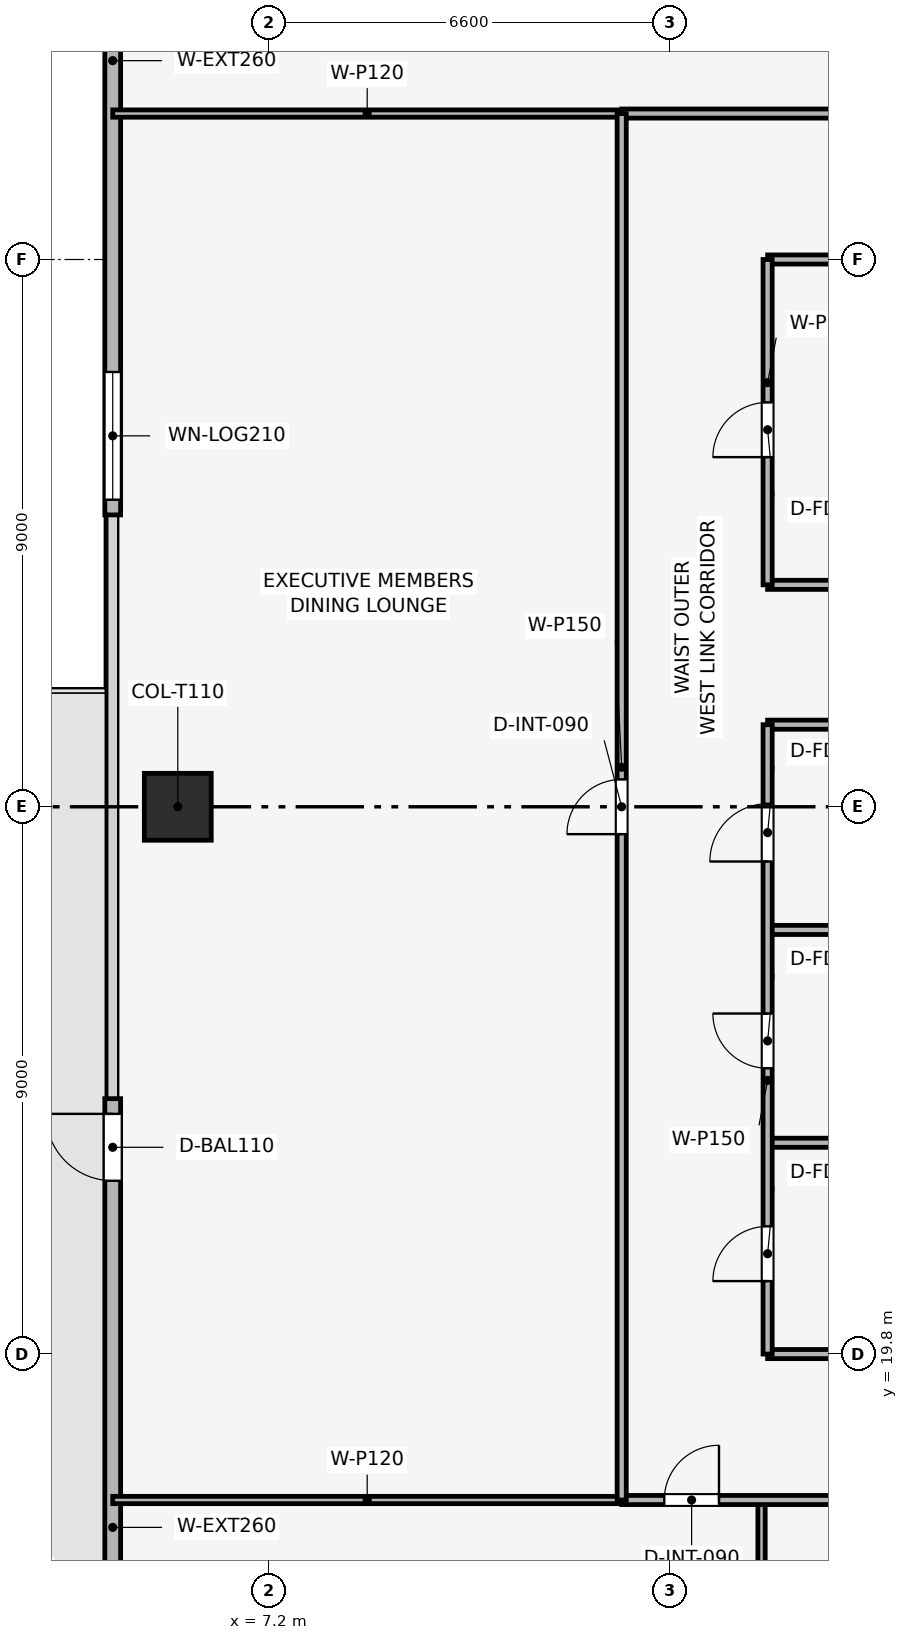
"""IFC4 building model, lengths in metres.
Left out: names, types, materials, properties, quantities, classifications, styles, units other than length and angle.
Written with IfcOpenShell. Run it as: python <this file> out.ifc"""

import sys

from ifc_helpers import new_model, si_unit, direction, frame, frame_2d, origin, origin_2d, place, context, subcontext, project, spatial, rectangle, extrude, element, fill, save


model = new_model("IFC4")
c1 = context("Model", 3, precision=1e-05, world=origin(), true_north=direction((0.0, 1.0)))
c2 = subcontext(c1, "Body", "Model", "MODEL_VIEW")
j1 = project(units=[si_unit("LENGTHUNIT", "METRE"), si_unit("PLANEANGLEUNIT", "RADIAN")], contexts=[c1])
p1 = place(None, origin())
s1 = spatial("IfcSite", under=j1, at=p1, CompositionType="ELEMENT")
p2 = place(p1, origin())
s2 = spatial("IfcBuilding", under=s1, at=p2, CompositionType="ELEMENT")
p3 = place(p2, frame((0.0, 0.0, 187.05)))
s3 = spatial("IfcBuildingStorey", under=s2, at=p3, CompositionType="ELEMENT", Elevation=187.05)
p4 = place(p3, frame((5.7, 28.8, 0.003), z_axis=(0.0, 0.0, 1.0), x_axis=(1.0, 0.0, 0.0)))
e1 = element("IfcColumn", 1, at=p4, inside=s3, PredefinedType="COLUMN", context=c2, shape_type="SweptSolid", body=[
    extrude(rectangle(XDim=1.1, YDim=1.1, at=origin_2d()), origin(), (0.0, 0.0, 1.0), 3.489),
])
p5 = place(p3, frame((4.63, 11.4, 0.0), z_axis=(0.0, 0.0, 1.0), x_axis=(0.0, 1.0, 0.0)))
e2 = element("IfcWall", 2, at=p5, inside=s3, PredefinedType="SOLIDWALL", context=c2, shape_type="SweptSolid", body=[
    extrude(rectangle(XDim=12.6, YDim=0.26, at=frame_2d((6.3, 0.0))), origin(), (0.0, 0.0, 1.0), 3.495),
])
p6 = place(p5, frame((11.25, 0.0, 0.0)))
e3 = element("IfcOpeningElement", 3, at=p6, cuts=e2, PredefinedType="OPENING", context=c2, shape_type="SweptSolid", body=[
    extrude(rectangle(XDim=1.1, YDim=2.2, at=frame_2d((0.55, 1.1))), frame((0.0, 0.14, 0.0), z_axis=(0.0, -1.0, 0.0), x_axis=(1.0, 0.0, 0.0)), (0.0, 0.0, 1.0), 0.28),
])
p7 = place(p3, frame((4.63, 33.6, 0.0), z_axis=(0.0, 0.0, 1.0), x_axis=(0.0, 1.0, 0.0)))
e4 = element("IfcWall", 4, at=p7, inside=s3, PredefinedType="SOLIDWALL", context=c2, shape_type="SweptSolid", body=[
    extrude(rectangle(XDim=12.6, YDim=0.26, at=frame_2d((6.3, 0.0))), origin(), (0.0, 0.0, 1.0), 3.495),
])
p8 = place(p7, frame((0.25, 0.0, 0.9)))
e5 = element("IfcOpeningElement", 5, at=p8, cuts=e4, PredefinedType="OPENING", context=c2, shape_type="SweptSolid", body=[
    extrude(rectangle(XDim=2.1, YDim=2.1, at=frame_2d((1.05, 1.05))), frame((0.0, 0.14, 0.0), z_axis=(0.0, -1.0, 0.0), x_axis=(1.0, 0.0, 0.0)), (0.0, 0.0, 1.0), 0.28),
])
p9 = place(p3, frame((15.4, 19.8, 0.0), z_axis=(0.0, 0.0, 1.0), x_axis=(1.0, 0.0, 0.0)))
e6 = element("IfcWall", 6, at=p9, inside=s3, PredefinedType="PARTITIONING", context=c2, shape_type="SweptSolid", body=[
    extrude(rectangle(XDim=4.4, YDim=0.15, at=frame_2d((2.2, 0.0))), origin(), (0.0, 0.0, 1.0), 3.03),
])
for number, where, z_axis, x_axis in (
    (7, (15.4, 23.275, 0.0), (0.0, 0.0, 1.0), (1.0, 0.0, 0.0)),
    (8, (15.4, 26.775, 0.0), (0.0, 0.0, 1.0), (1.0, 0.0, 0.0)),
    (9, (15.4, 30.15, 0.0), (0.0, 0.0, 1.0), (1.0, 0.0, 0.0)),
    (10, (15.4, 32.45, 0.0), (0.0, 0.0, 1.0), (1.0, 0.0, 0.0)),
):
    element("IfcWall", number, at=place(p3, frame(where, z_axis=z_axis, x_axis=x_axis)), inside=s3, PredefinedType="PARTITIONING", context=c2, shape_type="SweptSolid", body=[
        extrude(rectangle(XDim=4.4, YDim=0.15, at=frame_2d((2.2, 0.0))), origin(), (0.0, 0.0, 1.0), 3.495),
    ])
p10 = place(p3, frame((15.4, 37.8, 0.0), z_axis=(0.0, 0.0, 1.0), x_axis=(1.0, 0.0, 0.0)))
e11 = element("IfcWall", 11, at=p10, inside=s3, PredefinedType="PARTITIONING", context=c2, shape_type="SweptSolid", body=[
    extrude(rectangle(XDim=4.4, YDim=0.15, at=frame_2d((2.2, 0.0))), origin(), (0.0, 0.0, 1.0), 3.03),
])
p11 = place(p3, frame((15.4, 19.8, 0.0), z_axis=(0.0, 0.0, 1.0), x_axis=(0.0, 1.0, 0.0)))
e12 = element("IfcWall", 12, at=p11, inside=s3, PredefinedType="PARTITIONING", context=c2, shape_type="SweptSolid", body=[
    extrude(rectangle(XDim=10.35, YDim=0.15, at=frame_2d((5.175, 0.0))), origin(), (0.0, 0.0, 1.0), 3.03),
])
p12 = place(p11, frame((1.2, 0.0, 0.0)))
e13 = element("IfcOpeningElement", 13, at=p12, cuts=e12, PredefinedType="OPENING", context=c2, shape_type="SweptSolid", body=[
    extrude(rectangle(XDim=0.9, YDim=2.1, at=frame_2d((0.45, 1.05))), frame((0.0, 0.085, 0.0), z_axis=(0.0, -1.0, 0.0), x_axis=(1.0, 0.0, 0.0)), (0.0, 0.0, 1.0), 0.17),
])
p13 = place(p11, frame((4.7, 0.0, 0.0)))
e14 = element("IfcOpeningElement", 14, at=p13, cuts=e12, PredefinedType="OPENING", context=c2, shape_type="SweptSolid", body=[
    extrude(rectangle(XDim=0.9, YDim=2.1, at=frame_2d((0.45, 1.05))), frame((0.0, 0.085, 0.0), z_axis=(0.0, -1.0, 0.0), x_axis=(1.0, 0.0, 0.0)), (0.0, 0.0, 1.0), 0.17),
])
p14 = place(p11, frame((8.1, 0.0, 0.0)))
e15 = element("IfcOpeningElement", 15, at=p14, cuts=e12, PredefinedType="OPENING", context=c2, shape_type="SweptSolid", body=[
    extrude(rectangle(XDim=0.95, YDim=2.1, at=frame_2d((0.475, 1.05))), frame((0.0, 0.085, 0.0), z_axis=(0.0, -1.0, 0.0), x_axis=(1.0, 0.0, 0.0)), (0.0, 0.0, 1.0), 0.17),
])
p15 = place(p3, frame((15.4, 32.45, 0.0), z_axis=(0.0, 0.0, 1.0), x_axis=(0.0, 1.0, 0.0)))
e16 = element("IfcWall", 16, at=p15, inside=s3, PredefinedType="PARTITIONING", context=c2, shape_type="SweptSolid", body=[
    extrude(rectangle(XDim=5.35, YDim=0.15, at=frame_2d((2.675, 0.0))), origin(), (0.0, 0.0, 1.0), 3.03),
])
p16 = place(p15, frame((2.1, 0.0, 0.0)))
e17 = element("IfcOpeningElement", 17, at=p16, cuts=e16, PredefinedType="OPENING", context=c2, shape_type="SweptSolid", body=[
    extrude(rectangle(XDim=0.9, YDim=2.1, at=frame_2d((0.45, 1.05))), frame((0.0, 0.085, 0.0), z_axis=(0.0, -1.0, 0.0), x_axis=(1.0, 0.0, 0.0)), (0.0, 0.0, 1.0), 0.17),
])
p17 = place(p3, frame((15.3, 4.63, 0.0), z_axis=(0.0, 0.0, 1.0), x_axis=(0.0, 1.0, 0.0)))
e18 = element("IfcWall", 18, at=p17, inside=s3, PredefinedType="PARTITIONING", context=c2, shape_type="SweptSolid", body=[
    extrude(rectangle(XDim=12.77, YDim=0.12, at=frame_2d((6.385, 0.0))), origin(), (0.0, 0.0, 1.0), 2.98),
])
for number, where, z_axis, x_axis in (
    (19, (4.63, 17.4, 0.0), (0.0, 0.0, 1.0), (1.0, 0.0, 0.0)),
    (20, (4.63, 40.2, 0.0), (0.0, 0.0, 1.0), (1.0, 0.0, 0.0)),
):
    element("IfcWall", number, at=place(p3, frame(where, z_axis=z_axis, x_axis=x_axis)), inside=s3, PredefinedType="PARTITIONING", context=c2, shape_type="SweptSolid", body=[
        extrude(rectangle(XDim=8.37, YDim=0.12, at=frame_2d((4.185, 0.0))), origin(), (0.0, 0.0, 1.0), 2.98),
    ])
p18 = place(p3, frame((13.0, 17.4, 0.0), z_axis=(0.0, 0.0, 1.0), x_axis=(1.0, 0.0, 0.0)))
e21 = element("IfcWall", 21, at=p18, inside=s3, PredefinedType="PARTITIONING", context=c2, shape_type="SweptSolid", body=[
    extrude(rectangle(XDim=31.6, YDim=0.15, at=frame_2d((15.8, 0.0))), origin(), (0.0, 0.0, 1.0), 3.03),
])
p19 = place(p18, frame((0.7, 0.0, 0.0)))
e22 = element("IfcOpeningElement", 22, at=p19, cuts=e21, PredefinedType="OPENING", context=c2, shape_type="SweptSolid", body=[
    extrude(rectangle(XDim=0.9, YDim=2.1, at=frame_2d((0.45, 1.05))), frame((0.0, 0.085, 0.0), z_axis=(0.0, -1.0, 0.0), x_axis=(1.0, 0.0, 0.0)), (0.0, 0.0, 1.0), 0.17),
])
p20 = place(p18, frame((6.227, 0.0, 0.0)))
e23 = element("IfcOpeningElement", 23, at=p20, cuts=e21, PredefinedType="OPENING", context=c2, shape_type="SweptSolid", body=[
    extrude(rectangle(XDim=0.9, YDim=2.1, at=frame_2d((0.45, 1.05))), frame((0.0, 0.085, 0.0), z_axis=(0.0, -1.0, 0.0), x_axis=(1.0, 0.0, 0.0)), (0.0, 0.0, 1.0), 0.17),
])
p21 = place(p18, frame((15.279, 0.0, 0.0)))
e24 = element("IfcOpeningElement", 24, at=p21, cuts=e21, PredefinedType="OPENING", context=c2, shape_type="SweptSolid", body=[
    extrude(rectangle(XDim=0.9, YDim=2.1, at=frame_2d((0.45, 1.05))), frame((0.0, 0.085, 0.0), z_axis=(0.0, -1.0, 0.0), x_axis=(1.0, 0.0, 0.0)), (0.0, 0.0, 1.0), 0.17),
])
p22 = place(p18, frame((25.552, 0.0, 0.0)))
e25 = element("IfcOpeningElement", 25, at=p22, cuts=e21, PredefinedType="OPENING", context=c2, shape_type="SweptSolid", body=[
    extrude(rectangle(XDim=0.9, YDim=2.1, at=frame_2d((0.45, 1.05))), frame((0.0, 0.085, 0.0), z_axis=(0.0, -1.0, 0.0), x_axis=(1.0, 0.0, 0.0)), (0.0, 0.0, 1.0), 0.17),
])
p23 = place(p3, frame((13.0, 40.2, 0.0), z_axis=(0.0, 0.0, 1.0), x_axis=(1.0, 0.0, 0.0)))
e26 = element("IfcWall", 26, at=p23, inside=s3, PredefinedType="PARTITIONING", context=c2, shape_type="SweptSolid", body=[
    extrude(rectangle(XDim=31.6, YDim=0.15, at=frame_2d((15.8, 0.0))), origin(), (0.0, 0.0, 1.0), 3.03),
])
p24 = place(p23, frame((8.395, 0.0, 0.0)))
e27 = element("IfcOpeningElement", 27, at=p24, cuts=e26, PredefinedType="OPENING", context=c2, shape_type="SweptSolid", body=[
    extrude(rectangle(XDim=0.9, YDim=2.1, at=frame_2d((0.45, 1.05))), frame((0.0, 0.085, 0.0), z_axis=(0.0, -1.0, 0.0), x_axis=(1.0, 0.0, 0.0)), (0.0, 0.0, 1.0), 0.17),
])
p25 = place(p23, frame((24.195, 0.0, 0.0)))
e28 = element("IfcOpeningElement", 28, at=p25, cuts=e26, PredefinedType="OPENING", context=c2, shape_type="SweptSolid", body=[
    extrude(rectangle(XDim=0.9, YDim=2.1, at=frame_2d((0.45, 1.05))), frame((0.0, 0.085, 0.0), z_axis=(0.0, -1.0, 0.0), x_axis=(1.0, 0.0, 0.0)), (0.0, 0.0, 1.0), 0.17),
])
p26 = place(p3, frame((13.0, 17.4, 0.0), z_axis=(0.0, 0.0, 1.0), x_axis=(0.0, 1.0, 0.0)))
e29 = element("IfcWall", 29, at=p26, inside=s3, PredefinedType="PARTITIONING", context=c2, shape_type="SweptSolid", body=[
    extrude(rectangle(XDim=22.8, YDim=0.15, at=frame_2d((11.4, 0.0))), origin(), (0.0, 0.0, 1.0), 3.03),
])
p27 = place(p26, frame((10.95, 0.0, 0.0)))
e30 = element("IfcOpeningElement", 30, at=p27, cuts=e29, PredefinedType="OPENING", context=c2, shape_type="SweptSolid", body=[
    extrude(rectangle(XDim=0.9, YDim=2.1, at=frame_2d((0.45, 1.05))), frame((0.0, 0.085, 0.0), z_axis=(0.0, -1.0, 0.0), x_axis=(1.0, 0.0, 0.0)), (0.0, 0.0, 1.0), 0.17),
])
p28 = place(p6, origin())
e31 = element("IfcDoor", 31, at=p28, inside=s3, OperationType="SINGLE_SWING_RIGHT", PredefinedType="DOOR", context=c2, shape_type="SweptSolid", body=[
    extrude(rectangle(XDim=1.1, YDim=2.2, at=frame_2d((0.55, 1.1))), frame((0.0, 0.025, 0.0), z_axis=(0.0, -1.0, 0.0), x_axis=(1.0, 0.0, 0.0)), (0.0, 0.0, 1.0), 0.05),
])
fill(e3, e31)
p29 = place(p8, origin())
e32 = element("IfcWindow", 32, at=p29, inside=s3, PartitioningType="SINGLE_PANEL", PredefinedType="WINDOW", context=c2, shape_type="SweptSolid", body=[
    extrude(rectangle(XDim=2.1, YDim=2.1, at=frame_2d((1.05, 1.05))), frame((0.0, 0.03, 0.0), z_axis=(0.0, -1.0, 0.0), x_axis=(1.0, 0.0, 0.0)), (0.0, 0.0, 1.0), 0.06),
])
fill(e5, e32)
p30 = place(p12, origin())
e33 = element("IfcDoor", 33, at=p30, inside=s3, OperationType="SINGLE_SWING_LEFT", PredefinedType="DOOR", context=c2, shape_type="SweptSolid", body=[
    extrude(rectangle(XDim=0.9, YDim=2.1, at=frame_2d((0.45, 1.05))), frame((0.0, 0.025, 0.0), z_axis=(0.0, -1.0, 0.0), x_axis=(1.0, 0.0, 0.0)), (0.0, 0.0, 1.0), 0.05),
])
fill(e13, e33)
p31 = place(p13, origin())
e34 = element("IfcDoor", 34, at=p31, inside=s3, OperationType="SINGLE_SWING_RIGHT", PredefinedType="DOOR", context=c2, shape_type="SweptSolid", body=[
    extrude(rectangle(XDim=0.9, YDim=2.1, at=frame_2d((0.45, 1.05))), frame((0.0, 0.025, 0.0), z_axis=(0.0, -1.0, 0.0), x_axis=(1.0, 0.0, 0.0)), (0.0, 0.0, 1.0), 0.05),
])
fill(e14, e34)
p32 = place(p14, origin())
e35 = element("IfcDoor", 35, at=p32, inside=s3, OperationType="SINGLE_SWING_LEFT", PredefinedType="DOOR", context=c2, shape_type="SweptSolid", body=[
    extrude(rectangle(XDim=0.95, YDim=2.1, at=frame_2d((0.475, 1.05))), frame((0.0, 0.025, 0.0), z_axis=(0.0, -1.0, 0.0), x_axis=(1.0, 0.0, 0.0)), (0.0, 0.0, 1.0), 0.05),
])
fill(e15, e35)
p33 = place(p16, origin())
e36 = element("IfcDoor", 36, at=p33, inside=s3, OperationType="SINGLE_SWING_LEFT", PredefinedType="DOOR", context=c2, shape_type="SweptSolid", body=[
    extrude(rectangle(XDim=0.9, YDim=2.1, at=frame_2d((0.45, 1.05))), frame((0.0, 0.025, 0.0), z_axis=(0.0, -1.0, 0.0), x_axis=(1.0, 0.0, 0.0)), (0.0, 0.0, 1.0), 0.05),
])
fill(e17, e36)
p34 = place(p19, origin())
e37 = element("IfcDoor", 37, at=p34, inside=s3, OperationType="SINGLE_SWING_RIGHT", PredefinedType="DOOR", context=c2, shape_type="SweptSolid", body=[
    extrude(rectangle(XDim=0.9, YDim=2.1, at=frame_2d((0.45, 1.05))), frame((0.0, 0.025, 0.0), z_axis=(0.0, -1.0, 0.0), x_axis=(1.0, 0.0, 0.0)), (0.0, 0.0, 1.0), 0.05),
])
fill(e22, e37)
p35 = place(p27, origin())
e38 = element("IfcDoor", 38, at=p35, inside=s3, OperationType="SINGLE_SWING_LEFT", PredefinedType="DOOR", context=c2, shape_type="SweptSolid", body=[
    extrude(rectangle(XDim=0.9, YDim=2.1, at=frame_2d((0.45, 1.05))), frame((0.0, 0.025, 0.0), z_axis=(0.0, -1.0, 0.0), x_axis=(1.0, 0.0, 0.0)), (0.0, 0.0, 1.0), 0.05),
])
fill(e30, e38)
save(model, sys.argv[1])
